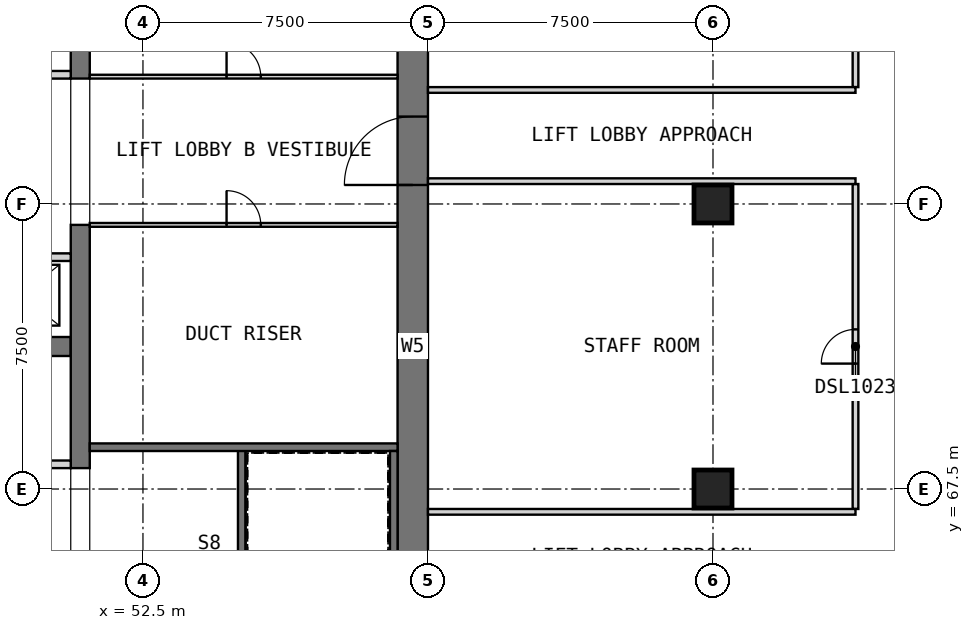
"""IFC4 building model, lengths in metres.
Left out: names, types, materials, properties, quantities, classifications, styles, units other than length and angle.
Written with IfcOpenShell. Run it as: python <this file> out.ifc"""

import sys

from ifc_helpers import new_model, si_unit, direction, frame, frame_2d, origin, origin_2d, place, context, subcontext, project, spatial, rectangle, extrude, element, fill, save


model = new_model("IFC4")
c1 = context("Model", 3, precision=1e-05, world=origin(), true_north=direction((0.0, 1.0)))
c2 = subcontext(c1, "Body", "Model", "MODEL_VIEW")
j1 = project(units=[si_unit("LENGTHUNIT", "METRE"), si_unit("PLANEANGLEUNIT", "RADIAN")], contexts=[c1])
p1 = place(None, origin())
s1 = spatial("IfcSite", under=j1, at=p1, CompositionType="ELEMENT")
p2 = place(p1, origin())
s2 = spatial("IfcBuilding", under=s1, at=p2, CompositionType="ELEMENT")
p3 = place(p2, frame((0.0, 0.0, 124.2)))
s3 = spatial("IfcBuildingStorey", under=s2, at=p3, CompositionType="ELEMENT", Elevation=124.2)
for number, where, z_axis, x_axis in (
    (1, (67.5, 67.5, 0.0), (0.0, 0.0, 1.0), (1.0, 0.0, 0.0)),
    (2, (67.5, 75.0, 0.0), (0.0, 0.0, 1.0), (1.0, 0.0, 0.0)),
):
    element("IfcColumn", number, at=place(p3, frame(where, z_axis=z_axis, x_axis=x_axis)), inside=s3, PredefinedType="COLUMN", context=c2, shape_type="SweptSolid", body=[
        extrude(rectangle(XDim=1.0, YDim=1.0, at=origin_2d()), origin(), (0.0, 0.0, 1.0), 6.0),
    ])
p4 = place(p3, frame((59.6, 60.8, 0.0), z_axis=(0.0, 0.0, 1.0), x_axis=(0.0, 1.0, 0.0)))
e3 = element("IfcWall", 3, at=p4, inside=s3, PredefinedType="SHEAR", context=c2, shape_type="SweptSolid", body=[
    extrude(rectangle(XDim=20.9, YDim=0.8, at=frame_2d((10.45, 0.0))), origin(), (0.0, 0.0, 1.0), 6.0),
])
p5 = place(p4, frame((14.7, 0.0, 0.0)))
e4 = element("IfcOpeningElement", 4, at=p5, cuts=e3, PredefinedType="OPENING", context=c2, shape_type="SweptSolid", body=[
    extrude(rectangle(XDim=1.8, YDim=2.1, at=frame_2d((0.9, 1.05))), frame((0.0, 0.41, 0.0), z_axis=(0.0, -1.0, 0.0), x_axis=(1.0, 0.0, 0.0)), (0.0, 0.0, 1.0), 0.82),
])
p6 = place(p3, frame((35.0, 71.25, 0.0), z_axis=(0.0, 0.0, 1.0), x_axis=(1.0, 0.0, 0.0)))
e5 = element("IfcWall", 5, at=p6, inside=s3, PredefinedType="SHEAR", context=c2, shape_type="SweptSolid", body=[
    extrude(rectangle(XDim=15.6, YDim=0.5, at=frame_2d((7.8, 0.0))), origin(), (0.0, 0.0, 1.0), 6.0),
])
p7 = place(p3, frame((50.85, 68.05, 0.0), z_axis=(0.0, 0.0, 1.0), x_axis=(0.0, 1.0, 0.0)))
e6 = element("IfcWall", 6, at=p7, inside=s3, PredefinedType="SHEAR", context=c2, shape_type="SweptSolid", body=[
    extrude(rectangle(XDim=6.4, YDim=0.5, at=frame_2d((3.2, 0.0))), origin(), (0.0, 0.0, 1.0), 6.0),
])
p8 = place(p3, frame((50.85, 78.3, 0.0), z_axis=(0.0, 0.0, 1.0), x_axis=(0.0, 1.0, 0.0)))
e7 = element("IfcWall", 7, at=p8, inside=s3, PredefinedType="SHEAR", context=c2, shape_type="SweptSolid", body=[
    extrude(rectangle(XDim=3.4, YDim=0.5, at=frame_2d((1.7, 0.0))), origin(), (0.0, 0.0, 1.0), 6.0),
])
p9 = place(p3, frame((48.0, 68.15, 0.0), z_axis=(0.0, 0.0, 1.0), x_axis=(1.0, 0.0, 0.0)))
e8 = element("IfcWall", 8, at=p9, inside=s3, PredefinedType="PARTITIONING", context=c2, shape_type="SweptSolid", body=[
    extrude(rectangle(XDim=2.6, YDim=0.2, at=frame_2d((1.3, 0.0))), origin(), (0.0, 0.0, 1.0), 5.75),
])
p10 = place(p9, frame((0.85, 0.0, 0.0)))
e9 = element("IfcOpeningElement", 9, at=p10, cuts=e8, PredefinedType="OPENING", context=c2, shape_type="SweptSolid", body=[
    extrude(rectangle(XDim=0.9, YDim=2.1, at=frame_2d((0.45, 1.05))), frame((0.0, 0.11, 0.0), z_axis=(0.0, -1.0, 0.0), x_axis=(1.0, 0.0, 0.0)), (0.0, 0.0, 1.0), 0.22),
])
p11 = place(p3, frame((35.0, 73.6, 0.0), z_axis=(0.0, 0.0, 1.0), x_axis=(1.0, 0.0, 0.0)))
e10 = element("IfcWall", 10, at=p11, inside=s3, PredefinedType="SOLIDWALL", context=c2, shape_type="SweptSolid", body=[
    extrude(rectangle(XDim=15.6, YDim=0.2, at=frame_2d((7.8, 0.0))), origin(), (0.0, 0.0, 1.0), 6.0),
])
p12 = place(p11, frame((0.75, 0.0, 0.0)))
e11 = element("IfcOpeningElement", 11, at=p12, cuts=e10, PredefinedType="OPENING", context=c2, shape_type="SweptSolid", body=[
    extrude(rectangle(XDim=1.1, YDim=2.1, at=frame_2d((0.55, 1.05))), frame((0.0, 0.11, 0.0), z_axis=(0.0, -1.0, 0.0), x_axis=(1.0, 0.0, 0.0)), (0.0, 0.0, 1.0), 0.22),
])
p13 = place(p11, frame((3.35, 0.0, 0.0)))
e12 = element("IfcOpeningElement", 12, at=p13, cuts=e10, PredefinedType="OPENING", context=c2, shape_type="SweptSolid", body=[
    extrude(rectangle(XDim=1.1, YDim=2.1, at=frame_2d((0.55, 1.05))), frame((0.0, 0.11, 0.0), z_axis=(0.0, -1.0, 0.0), x_axis=(1.0, 0.0, 0.0)), (0.0, 0.0, 1.0), 0.22),
])
p14 = place(p11, frame((5.95, 0.0, 0.0)))
e13 = element("IfcOpeningElement", 13, at=p14, cuts=e10, PredefinedType="OPENING", context=c2, shape_type="SweptSolid", body=[
    extrude(rectangle(XDim=1.1, YDim=2.1, at=frame_2d((0.55, 1.05))), frame((0.0, 0.11, 0.0), z_axis=(0.0, -1.0, 0.0), x_axis=(1.0, 0.0, 0.0)), (0.0, 0.0, 1.0), 0.22),
])
p15 = place(p11, frame((8.55, 0.0, 0.0)))
e14 = element("IfcOpeningElement", 14, at=p15, cuts=e10, PredefinedType="OPENING", context=c2, shape_type="SweptSolid", body=[
    extrude(rectangle(XDim=1.1, YDim=2.1, at=frame_2d((0.55, 1.05))), frame((0.0, 0.11, 0.0), z_axis=(0.0, -1.0, 0.0), x_axis=(1.0, 0.0, 0.0)), (0.0, 0.0, 1.0), 0.22),
])
p16 = place(p11, frame((11.15, 0.0, 0.0)))
e15 = element("IfcOpeningElement", 15, at=p16, cuts=e10, PredefinedType="OPENING", context=c2, shape_type="SweptSolid", body=[
    extrude(rectangle(XDim=1.1, YDim=2.1, at=frame_2d((0.55, 1.05))), frame((0.0, 0.11, 0.0), z_axis=(0.0, -1.0, 0.0), x_axis=(1.0, 0.0, 0.0)), (0.0, 0.0, 1.0), 0.22),
])
p17 = place(p11, frame((13.75, 0.0, 0.0)))
e16 = element("IfcOpeningElement", 16, at=p17, cuts=e10, PredefinedType="OPENING", context=c2, shape_type="SweptSolid", body=[
    extrude(rectangle(XDim=1.1, YDim=2.1, at=frame_2d((0.55, 1.05))), frame((0.0, 0.11, 0.0), z_axis=(0.0, -1.0, 0.0), x_axis=(1.0, 0.0, 0.0)), (0.0, 0.0, 1.0), 0.22),
])
p18 = place(p3, frame((35.0, 78.4, 0.0), z_axis=(0.0, 0.0, 1.0), x_axis=(1.0, 0.0, 0.0)))
e17 = element("IfcWall", 17, at=p18, inside=s3, PredefinedType="SOLIDWALL", context=c2, shape_type="SweptSolid", body=[
    extrude(rectangle(XDim=15.6, YDim=0.2, at=frame_2d((7.8, 0.0))), origin(), (0.0, 0.0, 1.0), 6.0),
])
p19 = place(p18, frame((0.75, 0.0, 0.0)))
e18 = element("IfcOpeningElement", 18, at=p19, cuts=e17, PredefinedType="OPENING", context=c2, shape_type="SweptSolid", body=[
    extrude(rectangle(XDim=1.1, YDim=2.1, at=frame_2d((0.55, 1.05))), frame((0.0, 0.11, 0.0), z_axis=(0.0, -1.0, 0.0), x_axis=(1.0, 0.0, 0.0)), (0.0, 0.0, 1.0), 0.22),
])
p20 = place(p18, frame((3.35, 0.0, 0.0)))
e19 = element("IfcOpeningElement", 19, at=p20, cuts=e17, PredefinedType="OPENING", context=c2, shape_type="SweptSolid", body=[
    extrude(rectangle(XDim=1.1, YDim=2.1, at=frame_2d((0.55, 1.05))), frame((0.0, 0.11, 0.0), z_axis=(0.0, -1.0, 0.0), x_axis=(1.0, 0.0, 0.0)), (0.0, 0.0, 1.0), 0.22),
])
p21 = place(p18, frame((11.15, 0.0, 0.0)))
e20 = element("IfcOpeningElement", 20, at=p21, cuts=e17, PredefinedType="OPENING", context=c2, shape_type="SweptSolid", body=[
    extrude(rectangle(XDim=1.1, YDim=2.1, at=frame_2d((0.55, 1.05))), frame((0.0, 0.11, 0.0), z_axis=(0.0, -1.0, 0.0), x_axis=(1.0, 0.0, 0.0)), (0.0, 0.0, 1.0), 0.22),
])
p22 = place(p18, frame((13.75, 0.0, 0.0)))
e21 = element("IfcOpeningElement", 21, at=p22, cuts=e17, PredefinedType="OPENING", context=c2, shape_type="SweptSolid", body=[
    extrude(rectangle(XDim=1.1, YDim=2.1, at=frame_2d((0.55, 1.05))), frame((0.0, 0.11, 0.0), z_axis=(0.0, -1.0, 0.0), x_axis=(1.0, 0.0, 0.0)), (0.0, 0.0, 1.0), 0.22),
])
p23 = place(p3, frame((55.1, 60.8, 0.0), z_axis=(0.0, 0.0, 1.0), x_axis=(0.0, 1.0, 0.0)))
e22 = element("IfcWall", 22, at=p23, inside=s3, PredefinedType="SOLIDWALL", context=c2, shape_type="SweptSolid", body=[
    extrude(rectangle(XDim=7.8, YDim=0.2, at=frame_2d((3.9, 0.0))), origin(), (0.0, 0.0, 1.0), 5.75),
])
p24 = place(p3, frame((51.1, 68.6, 0.0), z_axis=(0.0, 0.0, 1.0), x_axis=(1.0, 0.0, 0.0)))
e23 = element("IfcWall", 23, at=p24, inside=s3, PredefinedType="SOLIDWALL", context=c2, shape_type="SweptSolid", body=[
    extrude(rectangle(XDim=8.1, YDim=0.2, at=frame_2d((4.05, 0.0))), origin(), (0.0, 0.0, 1.0), 5.75),
])
p25 = place(p3, frame((59.1, 60.8, 0.0), z_axis=(0.0, 0.0, 1.0), x_axis=(0.0, 1.0, 0.0)))
e24 = element("IfcWall", 24, at=p25, inside=s3, PredefinedType="SOLIDWALL", context=c2, shape_type="SweptSolid", body=[
    extrude(rectangle(XDim=7.7, YDim=0.2, at=frame_2d((3.85, 0.0))), origin(), (0.0, 0.0, 1.0), 5.75),
])
p26 = place(p3, frame((51.1, 74.45, 0.0), z_axis=(0.0, 0.0, 1.0), x_axis=(1.0, 0.0, 0.0)))
e25 = element("IfcWall", 25, at=p26, inside=s3, PredefinedType="PARTITIONING", context=c2, shape_type="SweptSolid", body=[
    extrude(rectangle(XDim=8.1, YDim=0.1, at=frame_2d((4.05, 0.0))), origin(), (0.0, 0.0, 1.0), 5.75),
])
p27 = place(p26, frame((3.6, 0.0, 0.0)))
e26 = element("IfcOpeningElement", 26, at=p27, cuts=e25, PredefinedType="OPENING", context=c2, shape_type="SweptSolid", body=[
    extrude(rectangle(XDim=0.9, YDim=2.1, at=frame_2d((0.45, 1.05))), frame((0.0, 0.06, 0.0), z_axis=(0.0, -1.0, 0.0), x_axis=(1.0, 0.0, 0.0)), (0.0, 0.0, 1.0), 0.12),
])
p28 = place(p3, frame((51.1, 78.35, 0.0), z_axis=(0.0, 0.0, 1.0), x_axis=(1.0, 0.0, 0.0)))
e27 = element("IfcWall", 27, at=p28, inside=s3, PredefinedType="PARTITIONING", context=c2, shape_type="SweptSolid", body=[
    extrude(rectangle(XDim=8.1, YDim=0.1, at=frame_2d((4.05, 0.0))), origin(), (0.0, 0.0, 1.0), 5.75),
])
p29 = place(p28, frame((3.6, 0.0, 0.0)))
e28 = element("IfcOpeningElement", 28, at=p29, cuts=e27, PredefinedType="OPENING", context=c2, shape_type="SweptSolid", body=[
    extrude(rectangle(XDim=0.9, YDim=2.1, at=frame_2d((0.45, 1.05))), frame((0.0, 0.06, 0.0), z_axis=(0.0, -1.0, 0.0), x_axis=(1.0, 0.0, 0.0)), (0.0, 0.0, 1.0), 0.12),
])
p30 = place(p3, frame((71.25, 66.975, 0.0), z_axis=(0.0, 0.0, 1.0), x_axis=(0.0, 1.0, 0.0)))
e29 = element("IfcWall", 29, at=p30, inside=s3, PredefinedType="PARTITIONING", context=c2, shape_type="SweptSolid", body=[
    extrude(rectangle(XDim=8.55, YDim=0.15, at=frame_2d((4.275, 0.0))), origin(), (0.0, 0.0, 1.0), 5.75),
])
p31 = place(p30, frame((3.825, 0.0, 0.0)))
e30 = element("IfcOpeningElement", 30, at=p31, cuts=e29, PredefinedType="OPENING", context=c2, shape_type="SweptSolid", body=[
    extrude(rectangle(XDim=0.9, YDim=2.1, at=frame_2d((0.45, 1.05))), frame((0.0, 0.085, 0.0), z_axis=(0.0, -1.0, 0.0), x_axis=(1.0, 0.0, 0.0)), (0.0, 0.0, 1.0), 0.17),
])
p32 = place(p3, frame((71.25, 78.075, 0.0), z_axis=(0.0, 0.0, 1.0), x_axis=(0.0, 1.0, 0.0)))
e31 = element("IfcWall", 31, at=p32, inside=s3, PredefinedType="PARTITIONING", context=c2, shape_type="SweptSolid", body=[
    extrude(rectangle(XDim=8.1, YDim=0.15, at=frame_2d((4.05, 0.0))), origin(), (0.0, 0.0, 1.0), 5.75),
])
p33 = place(p32, frame((5.85, 0.0, 0.0)))
e32 = element("IfcOpeningElement", 32, at=p33, cuts=e31, PredefinedType="OPENING", context=c2, shape_type="SweptSolid", body=[
    extrude(rectangle(XDim=0.9, YDim=2.1, at=frame_2d((0.45, 1.05))), frame((0.0, 0.085, 0.0), z_axis=(0.0, -1.0, 0.0), x_axis=(1.0, 0.0, 0.0)), (0.0, 0.0, 1.0), 0.17),
])
p34 = place(p32, frame((1.725, 0.0, 0.0)))
e33 = element("IfcOpeningElement", 33, at=p34, cuts=e31, PredefinedType="OPENING", context=c2, shape_type="SweptSolid", body=[
    extrude(rectangle(XDim=0.9, YDim=2.1, at=frame_2d((0.45, 1.05))), frame((0.0, 0.085, 0.0), z_axis=(0.0, -1.0, 0.0), x_axis=(1.0, 0.0, 0.0)), (0.0, 0.0, 1.0), 0.17),
])
for number, where, z_axis, x_axis in (
    (34, (60.0, 66.9, 0.0), (0.0, 0.0, 1.0), (1.0, 0.0, 0.0)),
    (35, (60.0, 75.6, 0.0), (0.0, 0.0, 1.0), (1.0, 0.0, 0.0)),
    (36, (60.0, 78.0, 0.0), (0.0, 0.0, 1.0), (1.0, 0.0, 0.0)),
):
    element("IfcWall", number, at=place(p3, frame(where, z_axis=z_axis, x_axis=x_axis)), inside=s3, PredefinedType="PARTITIONING", context=c2, shape_type="SweptSolid", body=[
        extrude(rectangle(XDim=11.25, YDim=0.15, at=frame_2d((5.625, 0.0))), origin(), (0.0, 0.0, 1.0), 5.75),
    ])
p35 = place(p5, origin())
e37 = element("IfcDoor", 37, at=p35, inside=s3, OperationType="DOUBLE_DOOR_SINGLE_SWING", PredefinedType="DOOR", context=c2, shape_type="SweptSolid", body=[
    extrude(rectangle(XDim=1.8, YDim=2.1, at=frame_2d((0.9, 1.05))), frame((0.0, 0.025, 0.0), z_axis=(0.0, -1.0, 0.0), x_axis=(1.0, 0.0, 0.0)), (0.0, 0.0, 1.0), 0.05),
])
fill(e4, e37)
p36 = place(p27, origin())
e38 = element("IfcDoor", 38, at=p36, inside=s3, OperationType="SINGLE_SWING_RIGHT", PredefinedType="DOOR", context=c2, shape_type="SweptSolid", body=[
    extrude(rectangle(XDim=0.9, YDim=2.1, at=frame_2d((0.45, 1.05))), frame((0.0, 0.025, 0.0), z_axis=(0.0, -1.0, 0.0), x_axis=(1.0, 0.0, 0.0)), (0.0, 0.0, 1.0), 0.05),
])
fill(e26, e38)
p37 = place(p29, origin())
e39 = element("IfcDoor", 39, at=p37, inside=s3, OperationType="SINGLE_SWING_RIGHT", PredefinedType="DOOR", context=c2, shape_type="SweptSolid", body=[
    extrude(rectangle(XDim=0.9, YDim=2.1, at=frame_2d((0.45, 1.05))), frame((0.0, 0.025, 0.0), z_axis=(0.0, -1.0, 0.0), x_axis=(1.0, 0.0, 0.0)), (0.0, 0.0, 1.0), 0.05),
])
fill(e28, e39)
p38 = place(p31, origin())
e40 = element("IfcDoor", 40, at=p38, inside=s3, OperationType="SINGLE_SWING_LEFT", PredefinedType="DOOR", context=c2, shape_type="SweptSolid", body=[
    extrude(rectangle(XDim=0.9, YDim=2.1, at=frame_2d((0.45, 1.05))), frame((0.0, 0.025, 0.0), z_axis=(0.0, -1.0, 0.0), x_axis=(1.0, 0.0, 0.0)), (0.0, 0.0, 1.0), 0.05),
])
fill(e30, e40)
save(model, sys.argv[1])
